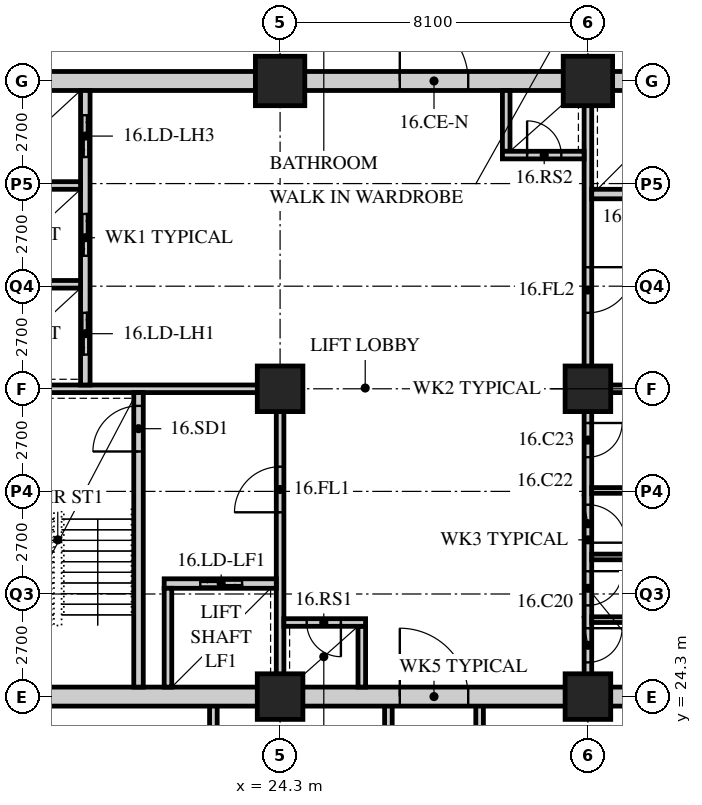
"""IFC4 building model, lengths in metres.
Left out: names, types, materials, properties, quantities, classifications, styles, units other than length and angle.
Written with IfcOpenShell. Run it as: python <this file> out.ifc"""

import sys

from ifc_helpers import new_model, si_unit, direction, frame, frame_2d, origin, origin_2d, place, context, subcontext, project, spatial, rectangle, hollow_rectangle, extrude, element, fill, save


model = new_model("IFC4")
c1 = context("Model", 3, precision=1e-05, world=origin(), true_north=direction((0.0, 1.0)))
c2 = subcontext(c1, "Body", "Model", "MODEL_VIEW")
j1 = project(units=[si_unit("LENGTHUNIT", "METRE"), si_unit("PLANEANGLEUNIT", "RADIAN")], contexts=[c1])
p1 = place(None, origin())
s1 = spatial("IfcSite", under=j1, at=p1, CompositionType="ELEMENT")
p2 = place(p1, origin())
s2 = spatial("IfcBuilding", under=s1, at=p2, CompositionType="ELEMENT")
p3 = place(p2, frame((0.0, 0.0, 67.0)))
s3 = spatial("IfcBuildingStorey", under=s2, at=p3, CompositionType="ELEMENT", Elevation=67.0)
for number, where, z_axis, x_axis in (
    (1, (24.3, 24.3, 0.0), (0.0, 0.0, 1.0), (1.0, 0.0, 0.0)),
    (2, (24.3, 32.4, 0.0), (0.0, 0.0, 1.0), (1.0, 0.0, 0.0)),
):
    element("IfcColumn", number, at=place(p3, frame(where, z_axis=z_axis, x_axis=x_axis)), inside=s3, PredefinedType="COLUMN", context=c2, shape_type="SweptSolid", body=[
        extrude(hollow_rectangle(XDim=1.2, YDim=1.2, WallThickness=0.12, at=origin_2d()), origin(), (0.0, 0.0, 1.0), 3.4),
    ])
p4 = place(p3, frame((24.3, 40.5, 0.0), z_axis=(0.0, 0.0, 1.0), x_axis=(1.0, 0.0, 0.0)))
e3 = element("IfcColumn", 3, at=p4, inside=s3, PredefinedType="COLUMN", context=c2, shape_type="SweptSolid", body=[
    extrude(hollow_rectangle(XDim=1.3, YDim=1.3, WallThickness=0.13, at=origin_2d()), origin(), (0.0, 0.0, 1.0), 3.4),
])
for number, where, z_axis, x_axis in (
    (4, (32.4, 24.3, 0.0), (0.0, 0.0, 1.0), (1.0, 0.0, 0.0)),
    (5, (32.4, 32.4, 0.0), (0.0, 0.0, 1.0), (1.0, 0.0, 0.0)),
):
    element("IfcColumn", number, at=place(p3, frame(where, z_axis=z_axis, x_axis=x_axis)), inside=s3, PredefinedType="COLUMN", context=c2, shape_type="SweptSolid", body=[
        extrude(hollow_rectangle(XDim=1.2, YDim=1.2, WallThickness=0.12, at=origin_2d()), origin(), (0.0, 0.0, 1.0), 3.4),
    ])
p5 = place(p3, frame((32.4, 40.5, 0.0), z_axis=(0.0, 0.0, 1.0), x_axis=(1.0, 0.0, 0.0)))
e6 = element("IfcColumn", 6, at=p5, inside=s3, PredefinedType="COLUMN", context=c2, shape_type="SweptSolid", body=[
    extrude(hollow_rectangle(XDim=1.3, YDim=1.3, WallThickness=0.13, at=origin_2d()), origin(), (0.0, 0.0, 1.0), 3.4),
])
for number, where, z_axis, x_axis in (
    (7, (22.545, 13.95, 0.0), (0.0, 0.0, 1.0), (0.0, 1.0, 0.0)),
    (8, (27.15, 13.95, 0.0), (0.0, 0.0, 1.0), (0.0, 1.0, 0.0)),
    (9, (29.55, 13.95, 0.0), (0.0, 0.0, 1.0), (0.0, 1.0, 0.0)),
):
    element("IfcWall", number, at=place(p3, frame(where, z_axis=z_axis, x_axis=x_axis)), inside=s3, PredefinedType="SOLIDWALL", context=c2, shape_type="SweptSolid", body=[
        extrude(rectangle(XDim=10.35, YDim=0.2, at=frame_2d((5.175, 0.0))), origin(), (0.0, 0.0, 1.0), 3.19),
    ])
p6 = place(p3, frame((15.95, 24.3, 0.0), z_axis=(0.0, 0.0, 1.0), x_axis=(1.0, 0.0, 0.0)))
e10 = element("IfcWall", 10, at=p6, inside=s3, PredefinedType="SOLIDWALL", context=c2, shape_type="SweptSolid", body=[
    extrude(rectangle(XDim=24.8, YDim=0.5, at=frame_2d((12.4, 0.0))), origin(), (0.0, 0.0, 1.0), 2.54),
])
p7 = place(p6, frame((11.5, 0.0, 0.0)))
e11 = element("IfcOpeningElement", 11, at=p7, cuts=e10, PredefinedType="OPENING", context=c2, shape_type="SweptSolid", body=[
    extrude(rectangle(XDim=1.8, YDim=2.4, at=frame_2d((0.9, 1.2))), frame((0.0, 0.26, 0.0), z_axis=(0.0, -1.0, 0.0), x_axis=(1.0, 0.0, 0.0)), (0.0, 0.0, 1.0), 0.52),
])
p8 = place(p3, frame((15.95, 40.5, 0.0), z_axis=(0.0, 0.0, 1.0), x_axis=(1.0, 0.0, 0.0)))
e12 = element("IfcWall", 12, at=p8, inside=s3, PredefinedType="SOLIDWALL", context=c2, shape_type="SweptSolid", body=[
    extrude(rectangle(XDim=24.8, YDim=0.5, at=frame_2d((12.4, 0.0))), origin(), (0.0, 0.0, 1.0), 2.54),
])
p9 = place(p8, frame((11.5, 0.0, 0.0)))
e13 = element("IfcOpeningElement", 13, at=p9, cuts=e12, PredefinedType="OPENING", context=c2, shape_type="SweptSolid", body=[
    extrude(rectangle(XDim=1.8, YDim=2.4, at=frame_2d((0.9, 1.2))), frame((0.0, 0.26, 0.0), z_axis=(0.0, -1.0, 0.0), x_axis=(1.0, 0.0, 0.0)), (0.0, 0.0, 1.0), 0.52),
])
p10 = place(p3, frame((16.45, 32.4, 0.0), z_axis=(0.0, 0.0, 1.0), x_axis=(1.0, 0.0, 0.0)))
e14 = element("IfcWall", 14, at=p10, inside=s3, PredefinedType="SOLIDWALL", context=c2, shape_type="SweptSolid", body=[
    extrude(rectangle(XDim=7.95, YDim=0.2, at=frame_2d((3.975, 0.0))), origin(), (0.0, 0.0, 1.0), 2.578),
])
p11 = place(p3, frame((24.3, 24.55, 0.0), z_axis=(0.0, 0.0, 1.0), x_axis=(0.0, 1.0, 0.0)))
e15 = element("IfcWall", 15, at=p11, inside=s3, PredefinedType="SOLIDWALL", context=c2, shape_type="SweptSolid", body=[
    extrude(rectangle(XDim=7.75, YDim=0.2, at=frame_2d((3.875, 0.0))), origin(), (0.0, 0.0, 1.0), 2.578),
])
p12 = place(p11, frame((4.6, 0.0, 0.0)))
e16 = element("IfcOpeningElement", 16, at=p12, cuts=e15, PredefinedType="OPENING", context=c2, shape_type="SweptSolid", body=[
    extrude(rectangle(XDim=1.2, YDim=2.1, at=frame_2d((0.6, 1.05))), frame((0.0, 0.11, 0.0), z_axis=(0.0, -1.0, 0.0), x_axis=(1.0, 0.0, 0.0)), (0.0, 0.0, 1.0), 0.22),
])
p13 = place(p3, frame((20.575, 24.55, 0.0), z_axis=(0.0, 0.0, 1.0), x_axis=(0.0, 1.0, 0.0)))
e17 = element("IfcWall", 17, at=p13, inside=s3, PredefinedType="SOLIDWALL", context=c2, shape_type="SweptSolid", body=[
    extrude(rectangle(XDim=7.75, YDim=0.25, at=frame_2d((3.875, 0.0))), origin(), (0.0, 0.0, 1.0), 3.19),
])
p14 = place(p13, frame((6.2, 0.0, 0.0)))
e18 = element("IfcOpeningElement", 18, at=p14, cuts=e17, PredefinedType="OPENING", context=c2, shape_type="SweptSolid", body=[
    extrude(rectangle(XDim=1.2, YDim=2.1, at=frame_2d((0.6, 1.05))), frame((0.0, 0.135, 0.0), z_axis=(0.0, -1.0, 0.0), x_axis=(1.0, 0.0, 0.0)), (0.0, 0.0, 1.0), 0.27),
])
p15 = place(p3, frame((21.25, 27.275, 0.0), z_axis=(0.0, 0.0, 1.0), x_axis=(1.0, 0.0, 0.0)))
e19 = element("IfcWall", 19, at=p15, inside=s3, PredefinedType="SOLIDWALL", context=c2, shape_type="SweptSolid", body=[
    extrude(rectangle(XDim=2.95, YDim=0.25, at=frame_2d((1.475, 0.0))), origin(), (0.0, 0.0, 1.0), 3.19),
])
p16 = place(p15, frame((0.95, 0.0, 0.0)))
e20 = element("IfcOpeningElement", 20, at=p16, cuts=e19, PredefinedType="OPENING", context=c2, shape_type="SweptSolid", body=[
    extrude(rectangle(XDim=1.1, YDim=2.4, at=frame_2d((0.55, 1.2))), frame((0.0, 0.135, 0.0), z_axis=(0.0, -1.0, 0.0), x_axis=(1.0, 0.0, 0.0)), (0.0, 0.0, 1.0), 0.27),
])
p17 = place(p3, frame((21.35, 24.55, 0.0), z_axis=(0.0, 0.0, 1.0), x_axis=(0.0, 1.0, 0.0)))
e21 = element("IfcWall", 21, at=p17, inside=s3, PredefinedType="SOLIDWALL", context=c2, shape_type="SweptSolid", body=[
    extrude(rectangle(XDim=2.6, YDim=0.2, at=frame_2d((1.3, 0.0))), origin(), (0.0, 0.0, 1.0), 3.19),
])
p18 = place(p3, frame((19.175, 32.5, 0.0), z_axis=(0.0, 0.0, 1.0), x_axis=(0.0, 1.0, 0.0)))
e22 = element("IfcWall", 22, at=p18, inside=s3, PredefinedType="SOLIDWALL", context=c2, shape_type="SweptSolid", body=[
    extrude(rectangle(XDim=7.75, YDim=0.25, at=frame_2d((3.875, 0.0))), origin(), (0.0, 0.0, 1.0), 3.19),
])
p19 = place(p18, frame((0.8, 0.0, 0.0)))
e23 = element("IfcOpeningElement", 23, at=p19, cuts=e22, PredefinedType="OPENING", context=c2, shape_type="SweptSolid", body=[
    extrude(rectangle(XDim=1.1, YDim=2.4, at=frame_2d((0.55, 1.2))), frame((0.0, 0.135, 0.0), z_axis=(0.0, -1.0, 0.0), x_axis=(1.0, 0.0, 0.0)), (0.0, 0.0, 1.0), 0.27),
])
p20 = place(p18, frame((3.4, 0.0, 0.0)))
e24 = element("IfcOpeningElement", 24, at=p20, cuts=e22, PredefinedType="OPENING", context=c2, shape_type="SweptSolid", body=[
    extrude(rectangle(XDim=1.1, YDim=2.4, at=frame_2d((0.55, 1.2))), frame((0.0, 0.135, 0.0), z_axis=(0.0, -1.0, 0.0), x_axis=(1.0, 0.0, 0.0)), (0.0, 0.0, 1.0), 0.27),
])
p21 = place(p18, frame((6.0, 0.0, 0.0)))
e25 = element("IfcOpeningElement", 25, at=p21, cuts=e22, PredefinedType="OPENING", context=c2, shape_type="SweptSolid", body=[
    extrude(rectangle(XDim=1.1, YDim=2.4, at=frame_2d((0.55, 1.2))), frame((0.0, 0.135, 0.0), z_axis=(0.0, -1.0, 0.0), x_axis=(1.0, 0.0, 0.0)), (0.0, 0.0, 1.0), 0.27),
])
for number, where, z_axis, x_axis in (
    (26, (16.45, 35.15, 0.0), (0.0, 0.0, 1.0), (1.0, 0.0, 0.0)),
    (27, (16.45, 37.75, 0.0), (0.0, 0.0, 1.0), (1.0, 0.0, 0.0)),
):
    element("IfcWall", number, at=place(p3, frame(where, z_axis=z_axis, x_axis=x_axis)), inside=s3, PredefinedType="SOLIDWALL", context=c2, shape_type="SweptSolid", body=[
        extrude(rectangle(XDim=2.6, YDim=0.2, at=frame_2d((1.3, 0.0))), origin(), (0.0, 0.0, 1.0), 3.19),
    ])
p22 = place(p3, frame((26.45, 24.55, 0.0), z_axis=(0.0, 0.0, 1.0), x_axis=(0.0, 1.0, 0.0)))
e28 = element("IfcWall", 28, at=p22, inside=s3, PredefinedType="SOLIDWALL", context=c2, shape_type="SweptSolid", body=[
    extrude(rectangle(XDim=1.6, YDim=0.2, at=frame_2d((0.8, 0.0))), origin(), (0.0, 0.0, 1.0), 3.19),
])
p23 = place(p3, frame((24.4, 26.25, 0.0), z_axis=(0.0, 0.0, 1.0), x_axis=(1.0, 0.0, 0.0)))
e29 = element("IfcWall", 29, at=p23, inside=s3, PredefinedType="SOLIDWALL", context=c2, shape_type="SweptSolid", body=[
    extrude(rectangle(XDim=2.15, YDim=0.2, at=frame_2d((1.075, 0.0))), origin(), (0.0, 0.0, 1.0), 3.19),
])
p24 = place(p23, frame((0.6, 0.0, 0.0)))
e30 = element("IfcOpeningElement", 30, at=p24, cuts=e29, PredefinedType="OPENING", context=c2, shape_type="SweptSolid", body=[
    extrude(rectangle(XDim=0.9, YDim=2.1, at=frame_2d((0.45, 1.05))), frame((0.0, 0.11, 0.0), z_axis=(0.0, -1.0, 0.0), x_axis=(1.0, 0.0, 0.0)), (0.0, 0.0, 1.0), 0.22),
])
p25 = place(p3, frame((32.3, 32.4, 0.0), z_axis=(0.0, 0.0, 1.0), x_axis=(1.0, 0.0, 0.0)))
e31 = element("IfcWall", 31, at=p25, inside=s3, PredefinedType="SOLIDWALL", context=c2, shape_type="SweptSolid", body=[
    extrude(rectangle(XDim=7.95, YDim=0.2, at=frame_2d((3.975, 0.0))), origin(), (0.0, 0.0, 1.0), 2.578),
])
p26 = place(p3, frame((32.4, 32.5, 0.0), z_axis=(0.0, 0.0, 1.0), x_axis=(0.0, 1.0, 0.0)))
e32 = element("IfcWall", 32, at=p26, inside=s3, PredefinedType="SOLIDWALL", context=c2, shape_type="SweptSolid", body=[
    extrude(rectangle(XDim=7.75, YDim=0.2, at=frame_2d((3.875, 0.0))), origin(), (0.0, 0.0, 1.0), 2.578),
])
p27 = place(p26, frame((1.9, 0.0, 0.0)))
e33 = element("IfcOpeningElement", 33, at=p27, cuts=e32, PredefinedType="OPENING", context=c2, shape_type="SweptSolid", body=[
    extrude(rectangle(XDim=1.2, YDim=2.1, at=frame_2d((0.6, 1.05))), frame((0.0, 0.11, 0.0), z_axis=(0.0, -1.0, 0.0), x_axis=(1.0, 0.0, 0.0)), (0.0, 0.0, 1.0), 0.22),
])
p28 = place(p3, frame((32.5, 37.525, 0.0), z_axis=(0.0, 0.0, 1.0), x_axis=(1.0, 0.0, 0.0)))
e34 = element("IfcWall", 34, at=p28, inside=s3, PredefinedType="SOLIDWALL", context=c2, shape_type="SweptSolid", body=[
    extrude(rectangle(XDim=2.95, YDim=0.25, at=frame_2d((1.475, 0.0))), origin(), (0.0, 0.0, 1.0), 3.19),
])
p29 = place(p28, frame((0.9, 0.0, 0.0)))
e35 = element("IfcOpeningElement", 35, at=p29, cuts=e34, PredefinedType="OPENING", context=c2, shape_type="SweptSolid", body=[
    extrude(rectangle(XDim=1.1, YDim=2.4, at=frame_2d((0.55, 1.2))), frame((0.0, 0.135, 0.0), z_axis=(0.0, -1.0, 0.0), x_axis=(1.0, 0.0, 0.0)), (0.0, 0.0, 1.0), 0.27),
])
p30 = place(p3, frame((30.25, 38.65, 0.0), z_axis=(0.0, 0.0, 1.0), x_axis=(0.0, 1.0, 0.0)))
e36 = element("IfcWall", 36, at=p30, inside=s3, PredefinedType="SOLIDWALL", context=c2, shape_type="SweptSolid", body=[
    extrude(rectangle(XDim=1.6, YDim=0.2, at=frame_2d((0.8, 0.0))), origin(), (0.0, 0.0, 1.0), 3.19),
])
p31 = place(p3, frame((30.15, 38.55, 0.0), z_axis=(0.0, 0.0, 1.0), x_axis=(1.0, 0.0, 0.0)))
e37 = element("IfcWall", 37, at=p31, inside=s3, PredefinedType="SOLIDWALL", context=c2, shape_type="SweptSolid", body=[
    extrude(rectangle(XDim=2.15, YDim=0.2, at=frame_2d((1.075, 0.0))), origin(), (0.0, 0.0, 1.0), 3.19),
])
p32 = place(p31, frame((0.65, 0.0, 0.0)))
e38 = element("IfcOpeningElement", 38, at=p32, cuts=e37, PredefinedType="OPENING", context=c2, shape_type="SweptSolid", body=[
    extrude(rectangle(XDim=0.9, YDim=2.1, at=frame_2d((0.45, 1.05))), frame((0.0, 0.11, 0.0), z_axis=(0.0, -1.0, 0.0), x_axis=(1.0, 0.0, 0.0)), (0.0, 0.0, 1.0), 0.22),
])
p33 = place(p3, frame((32.4, 24.55, 0.0), z_axis=(0.0, 0.0, 1.0), x_axis=(0.0, 1.0, 0.0)))
e39 = element("IfcWall", 39, at=p33, inside=s3, PredefinedType="PARTITIONING", context=c2, shape_type="SweptSolid", body=[
    extrude(rectangle(XDim=7.75, YDim=0.2, at=frame_2d((3.875, 0.0))), origin(), (0.0, 0.0, 1.0), 2.578),
])
p34 = place(p33, frame((0.65, 0.0, 0.0)))
e40 = element("IfcOpeningElement", 40, at=p34, cuts=e39, PredefinedType="OPENING", context=c2, shape_type="SweptSolid", body=[
    extrude(rectangle(XDim=0.9, YDim=2.1, at=frame_2d((0.45, 1.05))), frame((0.0, 0.11, 0.0), z_axis=(0.0, -1.0, 0.0), x_axis=(1.0, 0.0, 0.0)), (0.0, 0.0, 1.0), 0.22),
])
p35 = place(p33, frame((2.15, 0.0, 0.0)))
e41 = element("IfcOpeningElement", 41, at=p35, cuts=e39, PredefinedType="OPENING", context=c2, shape_type="SweptSolid", body=[
    extrude(rectangle(XDim=0.9, YDim=2.1, at=frame_2d((0.45, 1.05))), frame((0.0, 0.11, 0.0), z_axis=(0.0, -1.0, 0.0), x_axis=(1.0, 0.0, 0.0)), (0.0, 0.0, 1.0), 0.22),
])
p36 = place(p33, frame((3.8, 0.0, 0.0)))
e42 = element("IfcOpeningElement", 42, at=p36, cuts=e39, PredefinedType="OPENING", context=c2, shape_type="SweptSolid", body=[
    extrude(rectangle(XDim=1.0, YDim=2.1, at=frame_2d((0.5, 1.05))), frame((0.0, 0.11, 0.0), z_axis=(0.0, -1.0, 0.0), x_axis=(1.0, 0.0, 0.0)), (0.0, 0.0, 1.0), 0.22),
])
p37 = place(p33, frame((6.05, 0.0, 0.0)))
e43 = element("IfcOpeningElement", 43, at=p37, cuts=e39, PredefinedType="OPENING", context=c2, shape_type="SweptSolid", body=[
    extrude(rectangle(XDim=0.9, YDim=2.1, at=frame_2d((0.45, 1.05))), frame((0.0, 0.11, 0.0), z_axis=(0.0, -1.0, 0.0), x_axis=(1.0, 0.0, 0.0)), (0.0, 0.0, 1.0), 0.22),
])
for number, where, z_axis, x_axis in (
    (44, (32.5, 26.325, 0.0), (0.0, 0.0, 1.0), (1.0, 0.0, 0.0)),
    (45, (32.5, 27.975, 0.0), (0.0, 0.0, 1.0), (1.0, 0.0, 0.0)),
):
    element("IfcWall", number, at=place(p3, frame(where, z_axis=z_axis, x_axis=x_axis)), inside=s3, PredefinedType="PARTITIONING", context=c2, shape_type="SweptSolid", body=[
        extrude(rectangle(XDim=2.55, YDim=0.15, at=frame_2d((1.275, 0.0))), origin(), (0.0, 0.0, 1.0), 3.19),
    ])
p38 = place(p3, frame((32.5, 29.725, 0.0), z_axis=(0.0, 0.0, 1.0), x_axis=(1.0, 0.0, 0.0)))
e46 = element("IfcWall", 46, at=p38, inside=s3, PredefinedType="PARTITIONING", context=c2, shape_type="SweptSolid", body=[
    extrude(rectangle(XDim=2.4, YDim=0.15, at=frame_2d((1.2, 0.0))), origin(), (0.0, 0.0, 1.0), 3.19),
])
p39 = place(p34, origin())
e47 = element("IfcDoor", 47, at=p39, inside=s3, OperationType="SINGLE_SWING_LEFT", PredefinedType="DOOR", context=c2, shape_type="SweptSolid", body=[
    extrude(rectangle(XDim=0.9, YDim=2.1, at=frame_2d((0.45, 1.05))), frame((0.0, 0.025, 0.0), z_axis=(0.0, -1.0, 0.0), x_axis=(1.0, 0.0, 0.0)), (0.0, 0.0, 1.0), 0.05),
])
fill(e40, e47)
p40 = place(p35, origin())
e48 = element("IfcDoor", 48, at=p40, inside=s3, OperationType="SINGLE_SWING_LEFT", PredefinedType="DOOR", context=c2, shape_type="SweptSolid", body=[
    extrude(rectangle(XDim=0.9, YDim=2.1, at=frame_2d((0.45, 1.05))), frame((0.0, 0.025, 0.0), z_axis=(0.0, -1.0, 0.0), x_axis=(1.0, 0.0, 0.0)), (0.0, 0.0, 1.0), 0.05),
])
fill(e41, e48)
p41 = place(p36, origin())
e49 = element("IfcDoor", 49, at=p41, inside=s3, OperationType="SINGLE_SWING_RIGHT", PredefinedType="DOOR", context=c2, shape_type="SweptSolid", body=[
    extrude(rectangle(XDim=1.0, YDim=2.1, at=frame_2d((0.5, 1.05))), frame((0.0, 0.025, 0.0), z_axis=(0.0, -1.0, 0.0), x_axis=(1.0, 0.0, 0.0)), (0.0, 0.0, 1.0), 0.05),
])
fill(e42, e49)
p42 = place(p37, origin())
e50 = element("IfcDoor", 50, at=p42, inside=s3, OperationType="SINGLE_SWING_LEFT", PredefinedType="DOOR", context=c2, shape_type="SweptSolid", body=[
    extrude(rectangle(XDim=0.9, YDim=2.1, at=frame_2d((0.45, 1.05))), frame((0.0, 0.025, 0.0), z_axis=(0.0, -1.0, 0.0), x_axis=(1.0, 0.0, 0.0)), (0.0, 0.0, 1.0), 0.05),
])
fill(e43, e50)
p43 = place(p14, origin())
e51 = element("IfcDoor", 51, at=p43, inside=s3, OperationType="SINGLE_SWING_LEFT", PredefinedType="DOOR", context=c2, shape_type="SweptSolid", body=[
    extrude(rectangle(XDim=1.2, YDim=2.1, at=frame_2d((0.6, 1.05))), frame((0.0, 0.025, 0.0), z_axis=(0.0, -1.0, 0.0), x_axis=(1.0, 0.0, 0.0)), (0.0, 0.0, 1.0), 0.05),
])
fill(e18, e51)
p44 = place(p12, origin())
e52 = element("IfcDoor", 52, at=p44, inside=s3, OperationType="SINGLE_SWING_LEFT", PredefinedType="DOOR", context=c2, shape_type="SweptSolid", body=[
    extrude(rectangle(XDim=1.2, YDim=2.1, at=frame_2d((0.6, 1.05))), frame((0.0, 0.025, 0.0), z_axis=(0.0, -1.0, 0.0), x_axis=(1.0, 0.0, 0.0)), (0.0, 0.0, 1.0), 0.05),
])
fill(e16, e52)
p45 = place(p24, origin())
e53 = element("IfcDoor", 53, at=p45, inside=s3, OperationType="SINGLE_SWING_LEFT", PredefinedType="DOOR", context=c2, shape_type="SweptSolid", body=[
    extrude(rectangle(XDim=0.9, YDim=2.1, at=frame_2d((0.45, 1.05))), frame((0.0, 0.025, 0.0), z_axis=(0.0, -1.0, 0.0), x_axis=(1.0, 0.0, 0.0)), (0.0, 0.0, 1.0), 0.05),
])
fill(e30, e53)
p46 = place(p27, origin())
e54 = element("IfcDoor", 54, at=p46, inside=s3, OperationType="SINGLE_SWING_LEFT", PredefinedType="DOOR", context=c2, shape_type="SweptSolid", body=[
    extrude(rectangle(XDim=1.2, YDim=2.1, at=frame_2d((0.6, 1.05))), frame((0.0, 0.025, 0.0), z_axis=(0.0, -1.0, 0.0), x_axis=(1.0, 0.0, 0.0)), (0.0, 0.0, 1.0), 0.05),
])
fill(e33, e54)
p47 = place(p32, origin())
e55 = element("IfcDoor", 55, at=p47, inside=s3, OperationType="SINGLE_SWING_LEFT", PredefinedType="DOOR", context=c2, shape_type="SweptSolid", body=[
    extrude(rectangle(XDim=0.9, YDim=2.1, at=frame_2d((0.45, 1.05))), frame((0.0, 0.025, 0.0), z_axis=(0.0, -1.0, 0.0), x_axis=(1.0, 0.0, 0.0)), (0.0, 0.0, 1.0), 0.05),
])
fill(e38, e55)
p48 = place(p19, origin())
e56 = element("IfcDoor", 56, at=p48, inside=s3, OperationType="DOUBLE_DOOR_SLIDING", PredefinedType="DOOR", context=c2, shape_type="SweptSolid", body=[
    extrude(rectangle(XDim=1.1, YDim=2.4, at=frame_2d((0.55, 1.2))), frame((0.0, 0.025, 0.0), z_axis=(0.0, -1.0, 0.0), x_axis=(1.0, 0.0, 0.0)), (0.0, 0.0, 1.0), 0.05),
])
fill(e23, e56)
p49 = place(p20, origin())
e57 = element("IfcDoor", 57, at=p49, inside=s3, OperationType="DOUBLE_DOOR_SLIDING", PredefinedType="DOOR", context=c2, shape_type="SweptSolid", body=[
    extrude(rectangle(XDim=1.1, YDim=2.4, at=frame_2d((0.55, 1.2))), frame((0.0, 0.025, 0.0), z_axis=(0.0, -1.0, 0.0), x_axis=(1.0, 0.0, 0.0)), (0.0, 0.0, 1.0), 0.05),
])
fill(e24, e57)
p50 = place(p21, origin())
e58 = element("IfcDoor", 58, at=p50, inside=s3, OperationType="DOUBLE_DOOR_SLIDING", PredefinedType="DOOR", context=c2, shape_type="SweptSolid", body=[
    extrude(rectangle(XDim=1.1, YDim=2.4, at=frame_2d((0.55, 1.2))), frame((0.0, 0.025, 0.0), z_axis=(0.0, -1.0, 0.0), x_axis=(1.0, 0.0, 0.0)), (0.0, 0.0, 1.0), 0.05),
])
fill(e25, e58)
p51 = place(p16, origin())
e59 = element("IfcDoor", 59, at=p51, inside=s3, OperationType="DOUBLE_DOOR_SLIDING", PredefinedType="DOOR", context=c2, shape_type="SweptSolid", body=[
    extrude(rectangle(XDim=1.1, YDim=2.4, at=frame_2d((0.55, 1.2))), frame((0.0, 0.025, 0.0), z_axis=(0.0, -1.0, 0.0), x_axis=(1.0, 0.0, 0.0)), (0.0, 0.0, 1.0), 0.05),
])
fill(e20, e59)
p52 = place(p7, origin())
e60 = element("IfcDoor", 60, at=p52, inside=s3, OperationType="DOUBLE_DOOR_SINGLE_SWING", PredefinedType="DOOR", context=c2, shape_type="SweptSolid", body=[
    extrude(rectangle(XDim=1.8, YDim=2.4, at=frame_2d((0.9, 1.2))), frame((0.0, 0.025, 0.0), z_axis=(0.0, -1.0, 0.0), x_axis=(1.0, 0.0, 0.0)), (0.0, 0.0, 1.0), 0.05),
])
fill(e11, e60)
p53 = place(p9, origin())
e61 = element("IfcDoor", 61, at=p53, inside=s3, OperationType="DOUBLE_DOOR_SINGLE_SWING", PredefinedType="DOOR", context=c2, shape_type="SweptSolid", body=[
    extrude(rectangle(XDim=1.8, YDim=2.4, at=frame_2d((0.9, 1.2))), frame((0.0, 0.025, 0.0), z_axis=(0.0, -1.0, 0.0), x_axis=(1.0, 0.0, 0.0)), (0.0, 0.0, 1.0), 0.05),
])
fill(e13, e61)
save(model, sys.argv[1])
